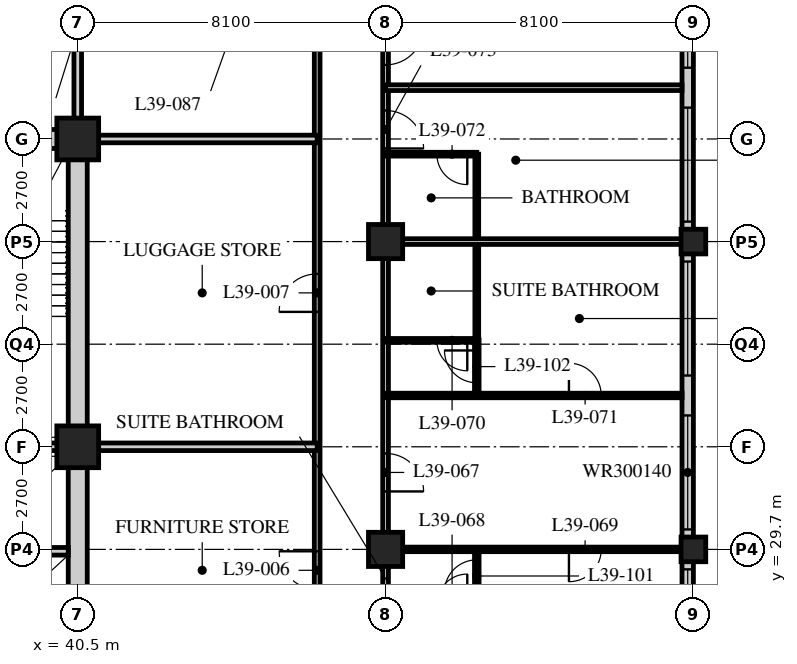
"""IFC4 building model, lengths in metres.
Left out: names, types, materials, properties, quantities, classifications, styles, units other than length and angle.
Written with IfcOpenShell. Run it as: python <this file> out.ifc"""

import sys

from ifc_helpers import new_model, si_unit, direction, frame, frame_2d, origin, origin_2d, place, context, subcontext, project, spatial, rectangle, hollow_rectangle, extrude, element, fill, save


model = new_model("IFC4")
c1 = context("Model", 3, precision=1e-05, world=origin(), true_north=direction((0.0, 1.0)))
c2 = subcontext(c1, "Body", "Model", "MODEL_VIEW")
j1 = project(units=[si_unit("LENGTHUNIT", "METRE"), si_unit("PLANEANGLEUNIT", "RADIAN")], contexts=[c1])
p1 = place(None, origin())
s1 = spatial("IfcSite", under=j1, at=p1, CompositionType="ELEMENT")
p2 = place(p1, origin())
s2 = spatial("IfcBuilding", under=s1, at=p2, CompositionType="ELEMENT")
p3 = place(p2, frame((0.0, 0.0, 151.0)))
s3 = spatial("IfcBuildingStorey", under=s2, at=p3, CompositionType="ELEMENT", Elevation=151.0)
for number, where, z_axis, x_axis in (
    (1, (40.5, 32.4, 0.0), (0.0, 0.0, 1.0), (1.0, 0.0, 0.0)),
    (2, (40.5, 40.5, 0.0), (0.0, 0.0, 1.0), (1.0, 0.0, 0.0)),
):
    element("IfcColumn", number, at=place(p3, frame(where, z_axis=z_axis, x_axis=x_axis)), inside=s3, PredefinedType="COLUMN", context=c2, shape_type="SweptSolid", body=[
        extrude(hollow_rectangle(XDim=1.1, YDim=1.1, WallThickness=0.1, at=origin_2d()), origin(), (0.0, 0.0, 1.0), 3.4),
    ])
for number, where, z_axis, x_axis in (
    (3, (48.6, 29.7, 0.0), (0.0, 0.0, 1.0), (1.0, 0.0, 0.0)),
    (4, (48.6, 37.8, 0.0), (0.0, 0.0, 1.0), (1.0, 0.0, 0.0)),
):
    element("IfcColumn", number, at=place(p3, frame(where, z_axis=z_axis, x_axis=x_axis)), inside=s3, PredefinedType="COLUMN", context=c2, shape_type="SweptSolid", body=[
        extrude(hollow_rectangle(XDim=0.9, YDim=0.9, WallThickness=0.1, at=origin_2d()), origin(), (0.0, 0.0, 1.0), 3.4),
    ])
for number, where, z_axis, x_axis in (
    (5, (56.7, 29.7, 0.0), (0.0, 0.0, 1.0), (1.0, 0.0, 0.0)),
    (6, (56.7, 37.8, 0.0), (0.0, 0.0, 1.0), (1.0, 0.0, 0.0)),
):
    element("IfcColumn", number, at=place(p3, frame(where, z_axis=z_axis, x_axis=x_axis)), inside=s3, PredefinedType="COLUMN", context=c2, shape_type="SweptSolid", body=[
        extrude(hollow_rectangle(XDim=0.65, YDim=0.65, WallThickness=0.055, at=origin_2d()), origin(), (0.0, 0.0, 1.0), 3.4),
    ])
p4 = place(p3, frame((56.55, 13.8, 0.0), z_axis=(0.0, 0.0, 1.0), x_axis=(0.0, 1.0, 0.0)))
e7 = element("IfcWall", 7, at=p4, inside=s3, PredefinedType="SOLIDWALL", context=c2, shape_type="SweptSolid", body=[
    extrude(rectangle(XDim=32.1, YDim=0.3, at=frame_2d((16.05, 0.0))), origin(), (0.0, 0.0, 1.0), 3.19),
])
p5 = place(p4, frame((0.225, 0.0, 0.9)))
e8 = element("IfcOpeningElement", 8, at=p5, cuts=e7, PredefinedType="OPENING", context=c2, shape_type="SweptSolid", body=[
    extrude(rectangle(XDim=3.0, YDim=1.4, at=frame_2d((1.5, 0.7))), frame((0.0, 0.16, 0.0), z_axis=(0.0, -1.0, 0.0), x_axis=(1.0, 0.0, 0.0)), (0.0, 0.0, 1.0), 0.32),
])
p6 = place(p4, frame((4.275, 0.0, 0.9)))
e9 = element("IfcOpeningElement", 9, at=p6, cuts=e7, PredefinedType="OPENING", context=c2, shape_type="SweptSolid", body=[
    extrude(rectangle(XDim=3.0, YDim=1.4, at=frame_2d((1.5, 0.7))), frame((0.0, 0.16, 0.0), z_axis=(0.0, -1.0, 0.0), x_axis=(1.0, 0.0, 0.0)), (0.0, 0.0, 1.0), 0.32),
])
p7 = place(p4, frame((8.325, 0.0, 0.9)))
e10 = element("IfcOpeningElement", 10, at=p7, cuts=e7, PredefinedType="OPENING", context=c2, shape_type="SweptSolid", body=[
    extrude(rectangle(XDim=3.0, YDim=1.4, at=frame_2d((1.5, 0.7))), frame((0.0, 0.16, 0.0), z_axis=(0.0, -1.0, 0.0), x_axis=(1.0, 0.0, 0.0)), (0.0, 0.0, 1.0), 0.32),
])
p8 = place(p4, frame((12.375, 0.0, 0.9)))
e11 = element("IfcOpeningElement", 11, at=p8, cuts=e7, PredefinedType="OPENING", context=c2, shape_type="SweptSolid", body=[
    extrude(rectangle(XDim=3.0, YDim=1.4, at=frame_2d((1.5, 0.7))), frame((0.0, 0.16, 0.0), z_axis=(0.0, -1.0, 0.0), x_axis=(1.0, 0.0, 0.0)), (0.0, 0.0, 1.0), 0.32),
])
p9 = place(p4, frame((16.425, 0.0, 0.9)))
e12 = element("IfcOpeningElement", 12, at=p9, cuts=e7, PredefinedType="OPENING", context=c2, shape_type="SweptSolid", body=[
    extrude(rectangle(XDim=3.0, YDim=1.4, at=frame_2d((1.5, 0.7))), frame((0.0, 0.16, 0.0), z_axis=(0.0, -1.0, 0.0), x_axis=(1.0, 0.0, 0.0)), (0.0, 0.0, 1.0), 0.32),
])
p10 = place(p4, frame((20.475, 0.0, 0.9)))
e13 = element("IfcOpeningElement", 13, at=p10, cuts=e7, PredefinedType="OPENING", context=c2, shape_type="SweptSolid", body=[
    extrude(rectangle(XDim=3.0, YDim=1.4, at=frame_2d((1.5, 0.7))), frame((0.0, 0.16, 0.0), z_axis=(0.0, -1.0, 0.0), x_axis=(1.0, 0.0, 0.0)), (0.0, 0.0, 1.0), 0.32),
])
p11 = place(p4, frame((24.525, 0.0, 0.9)))
e14 = element("IfcOpeningElement", 14, at=p11, cuts=e7, PredefinedType="OPENING", context=c2, shape_type="SweptSolid", body=[
    extrude(rectangle(XDim=3.0, YDim=1.4, at=frame_2d((1.5, 0.7))), frame((0.0, 0.16, 0.0), z_axis=(0.0, -1.0, 0.0), x_axis=(1.0, 0.0, 0.0)), (0.0, 0.0, 1.0), 0.32),
])
p12 = place(p4, frame((28.575, 0.0, 0.9)))
e15 = element("IfcOpeningElement", 15, at=p12, cuts=e7, PredefinedType="OPENING", context=c2, shape_type="SweptSolid", body=[
    extrude(rectangle(XDim=3.0, YDim=1.4, at=frame_2d((1.5, 0.7))), frame((0.0, 0.16, 0.0), z_axis=(0.0, -1.0, 0.0), x_axis=(1.0, 0.0, 0.0)), (0.0, 0.0, 1.0), 0.32),
])
p13 = place(p3, frame((48.6, 17.55, 0.0), z_axis=(0.0, 0.0, 1.0), x_axis=(0.0, 1.0, 0.0)))
e16 = element("IfcWall", 16, at=p13, inside=s3, PredefinedType="PARTITIONING", context=c2, shape_type="SweptSolid", body=[
    extrude(rectangle(XDim=28.35, YDim=0.15, at=frame_2d((14.175, 0.0))), origin(), (0.0, 0.0, 1.0), 2.42),
])
p14 = place(p13, frame((0.3, 0.0, 0.0)))
e17 = element("IfcOpeningElement", 17, at=p14, cuts=e16, PredefinedType="OPENING", context=c2, shape_type="SweptSolid", body=[
    extrude(rectangle(XDim=1.0, YDim=2.1, at=frame_2d((0.5, 1.05))), frame((0.0, 0.085, 0.0), z_axis=(0.0, -1.0, 0.0), x_axis=(1.0, 0.0, 0.0)), (0.0, 0.0, 1.0), 0.17),
])
p15 = place(p13, frame((6.5, 0.0, 0.0)))
e18 = element("IfcOpeningElement", 18, at=p15, cuts=e16, PredefinedType="OPENING", context=c2, shape_type="SweptSolid", body=[
    extrude(rectangle(XDim=1.0, YDim=2.1, at=frame_2d((0.5, 1.05))), frame((0.0, 0.085, 0.0), z_axis=(0.0, -1.0, 0.0), x_axis=(1.0, 0.0, 0.0)), (0.0, 0.0, 1.0), 0.17),
])
p16 = place(p13, frame((13.675, 0.0, 0.0)))
e19 = element("IfcOpeningElement", 19, at=p16, cuts=e16, PredefinedType="OPENING", context=c2, shape_type="SweptSolid", body=[
    extrude(rectangle(XDim=1.0, YDim=2.1, at=frame_2d((0.5, 1.05))), frame((0.0, 0.085, 0.0), z_axis=(0.0, -1.0, 0.0), x_axis=(1.0, 0.0, 0.0)), (0.0, 0.0, 1.0), 0.17),
])
p17 = place(p13, frame((22.7, 0.0, 0.0)))
e20 = element("IfcOpeningElement", 20, at=p17, cuts=e16, PredefinedType="OPENING", context=c2, shape_type="SweptSolid", body=[
    extrude(rectangle(XDim=1.0, YDim=2.1, at=frame_2d((0.5, 1.05))), frame((0.0, 0.085, 0.0), z_axis=(0.0, -1.0, 0.0), x_axis=(1.0, 0.0, 0.0)), (0.0, 0.0, 1.0), 0.17),
])
p18 = place(p13, frame((24.9, 0.0, 0.0)))
e21 = element("IfcOpeningElement", 21, at=p18, cuts=e16, PredefinedType="OPENING", context=c2, shape_type="SweptSolid", body=[
    extrude(rectangle(XDim=1.0, YDim=2.1, at=frame_2d((0.5, 1.05))), frame((0.0, 0.085, 0.0), z_axis=(0.0, -1.0, 0.0), x_axis=(1.0, 0.0, 0.0)), (0.0, 0.0, 1.0), 0.17),
])
p19 = place(p3, frame((46.8, 19.35, 0.0), z_axis=(0.0, 0.0, 1.0), x_axis=(0.0, 1.0, 0.0)))
e22 = element("IfcWall", 22, at=p19, inside=s3, PredefinedType="PARTITIONING", context=c2, shape_type="SweptSolid", body=[
    extrude(rectangle(XDim=24.75, YDim=0.15, at=frame_2d((12.375, 0.0))), origin(), (0.0, 0.0, 1.0), 3.19),
])
p20 = place(p19, frame((5.25, 0.0, 0.0)))
e23 = element("IfcOpeningElement", 23, at=p20, cuts=e22, PredefinedType="OPENING", context=c2, shape_type="SweptSolid", body=[
    extrude(rectangle(XDim=1.0, YDim=2.1, at=frame_2d((0.5, 1.05))), frame((0.0, 0.085, 0.0), z_axis=(0.0, -1.0, 0.0), x_axis=(1.0, 0.0, 0.0)), (0.0, 0.0, 1.0), 0.17),
])
p21 = place(p19, frame((9.3, 0.0, 0.0)))
e24 = element("IfcOpeningElement", 24, at=p21, cuts=e22, PredefinedType="OPENING", context=c2, shape_type="SweptSolid", body=[
    extrude(rectangle(XDim=1.0, YDim=2.1, at=frame_2d((0.5, 1.05))), frame((0.0, 0.085, 0.0), z_axis=(0.0, -1.0, 0.0), x_axis=(1.0, 0.0, 0.0)), (0.0, 0.0, 1.0), 0.17),
])
p22 = place(p19, frame((16.6, 0.0, 0.0)))
e25 = element("IfcOpeningElement", 25, at=p22, cuts=e22, PredefinedType="OPENING", context=c2, shape_type="SweptSolid", body=[
    extrude(rectangle(XDim=1.0, YDim=2.1, at=frame_2d((0.5, 1.05))), frame((0.0, 0.085, 0.0), z_axis=(0.0, -1.0, 0.0), x_axis=(1.0, 0.0, 0.0)), (0.0, 0.0, 1.0), 0.17),
])
p23 = place(p3, frame((40.5, 32.4, 0.0), z_axis=(0.0, 0.0, 1.0), x_axis=(1.0, 0.0, 0.0)))
e26 = element("IfcWall", 26, at=p23, inside=s3, PredefinedType="SOLIDWALL", context=c2, shape_type="SweptSolid", body=[
    extrude(rectangle(XDim=6.3, YDim=0.2, at=frame_2d((3.15, 0.0))), origin(), (0.0, 0.0, 1.0), 3.19),
])
p24 = place(p3, frame((40.5, 40.5, 0.0), z_axis=(0.0, 0.0, 1.0), x_axis=(0.0, 1.0, 0.0)))
e27 = element("IfcWall", 27, at=p24, inside=s3, PredefinedType="SOLIDWALL", context=c2, shape_type="SweptSolid", body=[
    extrude(rectangle(XDim=3.6, YDim=0.2, at=frame_2d((1.8, 0.0))), origin(), (0.0, 0.0, 1.0), 2.42),
])
p25 = place(p3, frame((40.5, 40.5, 0.0), z_axis=(0.0, 0.0, 1.0), x_axis=(1.0, 0.0, 0.0)))
e28 = element("IfcWall", 28, at=p25, inside=s3, PredefinedType="SOLIDWALL", context=c2, shape_type="SweptSolid", body=[
    extrude(rectangle(XDim=6.3, YDim=0.2, at=frame_2d((3.15, 0.0))), origin(), (0.0, 0.0, 1.0), 3.19),
])
p26 = place(p3, frame((48.6, 29.7, 0.0), z_axis=(0.0, 0.0, 1.0), x_axis=(1.0, 0.0, 0.0)))
e29 = element("IfcWall", 29, at=p26, inside=s3, PredefinedType="PARTITIONING", context=c2, shape_type="SweptSolid", body=[
    extrude(rectangle(XDim=7.8, YDim=0.12, at=frame_2d((3.9, 0.0))), origin(), (0.0, 0.0, 1.0), 2.42),
])
p27 = place(p26, frame((4.825, 0.0, 0.0)))
e30 = element("IfcOpeningElement", 30, at=p27, cuts=e29, PredefinedType="OPENING", context=c2, shape_type="SweptSolid", body=[
    extrude(rectangle(XDim=0.85, YDim=2.1, at=frame_2d((0.425, 1.05))), frame((0.0, 0.07, 0.0), z_axis=(0.0, -1.0, 0.0), x_axis=(1.0, 0.0, 0.0)), (0.0, 0.0, 1.0), 0.14),
])
p28 = place(p3, frame((51.0, 35.2, 0.0), z_axis=(0.0, 0.0, 1.0), x_axis=(0.0, 1.0, 0.0)))
e31 = element("IfcWall", 31, at=p28, inside=s3, PredefinedType="PARTITIONING", context=c2, shape_type="SweptSolid", body=[
    extrude(rectangle(XDim=4.9, YDim=0.1, at=frame_2d((2.45, 0.0))), origin(), (0.0, 0.0, 1.0), 3.19),
])
p29 = place(p3, frame((48.6, 35.2, 0.0), z_axis=(0.0, 0.0, 1.0), x_axis=(1.0, 0.0, 0.0)))
e32 = element("IfcWall", 32, at=p29, inside=s3, PredefinedType="PARTITIONING", context=c2, shape_type="SweptSolid", body=[
    extrude(rectangle(XDim=2.4, YDim=0.1, at=frame_2d((1.2, 0.0))), origin(), (0.0, 0.0, 1.0), 3.19),
])
p30 = place(p29, frame((1.35, 0.0, 0.0)))
e33 = element("IfcOpeningElement", 33, at=p30, cuts=e32, PredefinedType="OPENING", context=c2, shape_type="SweptSolid", body=[
    extrude(rectangle(XDim=0.8, YDim=2.1, at=frame_2d((0.4, 1.05))), frame((0.0, 0.06, 0.0), z_axis=(0.0, -1.0, 0.0), x_axis=(1.0, 0.0, 0.0)), (0.0, 0.0, 1.0), 0.12),
])
p31 = place(p3, frame((48.6, 33.75, 0.0), z_axis=(0.0, 0.0, 1.0), x_axis=(1.0, 0.0, 0.0)))
e34 = element("IfcWall", 34, at=p31, inside=s3, PredefinedType="PARTITIONING", context=c2, shape_type="SweptSolid", body=[
    extrude(rectangle(XDim=7.8, YDim=0.12, at=frame_2d((3.9, 0.0))), origin(), (0.0, 0.0, 1.0), 3.19),
])
p32 = place(p31, frame((4.825, 0.0, 0.0)))
e35 = element("IfcOpeningElement", 35, at=p32, cuts=e34, PredefinedType="OPENING", context=c2, shape_type="SweptSolid", body=[
    extrude(rectangle(XDim=0.85, YDim=2.1, at=frame_2d((0.425, 1.05))), frame((0.0, 0.07, 0.0), z_axis=(0.0, -1.0, 0.0), x_axis=(1.0, 0.0, 0.0)), (0.0, 0.0, 1.0), 0.14),
])
p33 = place(p3, frame((48.6, 37.8, 0.0), z_axis=(0.0, 0.0, 1.0), x_axis=(1.0, 0.0, 0.0)))
e36 = element("IfcWall", 36, at=p33, inside=s3, PredefinedType="PARTITIONING", context=c2, shape_type="SweptSolid", body=[
    extrude(rectangle(XDim=7.8, YDim=0.15, at=frame_2d((3.9, 0.0))), origin(), (0.0, 0.0, 1.0), 2.42),
])
p34 = place(p3, frame((48.6, 40.1, 0.0), z_axis=(0.0, 0.0, 1.0), x_axis=(1.0, 0.0, 0.0)))
e37 = element("IfcWall", 37, at=p34, inside=s3, PredefinedType="PARTITIONING", context=c2, shape_type="SweptSolid", body=[
    extrude(rectangle(XDim=2.4, YDim=0.1, at=frame_2d((1.2, 0.0))), origin(), (0.0, 0.0, 1.0), 3.19),
])
p35 = place(p34, frame((1.35, 0.0, 0.0)))
e38 = element("IfcOpeningElement", 38, at=p35, cuts=e37, PredefinedType="OPENING", context=c2, shape_type="SweptSolid", body=[
    extrude(rectangle(XDim=0.8, YDim=2.1, at=frame_2d((0.4, 1.05))), frame((0.0, 0.06, 0.0), z_axis=(0.0, -1.0, 0.0), x_axis=(1.0, 0.0, 0.0)), (0.0, 0.0, 1.0), 0.12),
])
p36 = place(p3, frame((48.6, 41.85, 0.0), z_axis=(0.0, 0.0, 1.0), x_axis=(1.0, 0.0, 0.0)))
e39 = element("IfcWall", 39, at=p36, inside=s3, PredefinedType="PARTITIONING", context=c2, shape_type="SweptSolid", body=[
    extrude(rectangle(XDim=7.8, YDim=0.15, at=frame_2d((3.9, 0.0))), origin(), (0.0, 0.0, 1.0), 3.19),
])
p37 = place(p3, frame((51.0, 29.7, 0.0), z_axis=(0.0, 0.0, 1.0), x_axis=(0.0, -1.0, 0.0)))
e40 = element("IfcWall", 40, at=p37, inside=s3, PredefinedType="PARTITIONING", context=c2, shape_type="SweptSolid", body=[
    extrude(rectangle(XDim=1.46, YDim=0.12, at=frame_2d((0.73, 0.0))), origin(), (0.0, 0.0, 1.0), 3.19),
])
p38 = place(p37, frame((0.275, 0.0, 0.0)))
e41 = element("IfcOpeningElement", 41, at=p38, cuts=e40, PredefinedType="OPENING", context=c2, shape_type="SweptSolid", body=[
    extrude(rectangle(XDim=0.85, YDim=2.1, at=frame_2d((0.425, 1.05))), frame((0.0, 0.07, 0.0), z_axis=(0.0, -1.0, 0.0), x_axis=(1.0, 0.0, 0.0)), (0.0, 0.0, 1.0), 0.14),
])
p39 = place(p3, frame((51.0, 35.21, 0.0), z_axis=(0.0, 0.0, 1.0), x_axis=(0.0, -1.0, 0.0)))
e42 = element("IfcWall", 42, at=p39, inside=s3, PredefinedType="PARTITIONING", context=c2, shape_type="SweptSolid", body=[
    extrude(rectangle(XDim=1.46, YDim=0.12, at=frame_2d((0.73, 0.0))), origin(), (0.0, 0.0, 1.0), 3.19),
])
p40 = place(p39, frame((0.275, 0.0, 0.0)))
e43 = element("IfcOpeningElement", 43, at=p40, cuts=e42, PredefinedType="OPENING", context=c2, shape_type="SweptSolid", body=[
    extrude(rectangle(XDim=0.85, YDim=2.1, at=frame_2d((0.425, 1.05))), frame((0.0, 0.07, 0.0), z_axis=(0.0, -1.0, 0.0), x_axis=(1.0, 0.0, 0.0)), (0.0, 0.0, 1.0), 0.14),
])
p41 = place(p3, frame((15.95, 40.5, 0.0), z_axis=(0.0, 0.0, 1.0), x_axis=(1.0, 0.0, 0.0)))
e44 = element("IfcWall", 44, at=p41, inside=s3, PredefinedType="SOLIDWALL", context=c2, shape_type="SweptSolid", body=[
    extrude(rectangle(XDim=24.8, YDim=0.5, at=frame_2d((12.4, 0.0))), origin(), (0.0, 0.0, 1.0), 2.42),
])
p42 = place(p41, frame((11.5, 0.0, 0.0)))
e45 = element("IfcOpeningElement", 45, at=p42, cuts=e44, PredefinedType="OPENING", context=c2, shape_type="SweptSolid", body=[
    extrude(rectangle(XDim=1.8, YDim=2.4, at=frame_2d((0.9, 1.2))), frame((0.0, 0.26, 0.0), z_axis=(0.0, -1.0, 0.0), x_axis=(1.0, 0.0, 0.0)), (0.0, 0.0, 1.0), 0.52),
])
p43 = place(p3, frame((40.5, 24.55, 0.0), z_axis=(0.0, 0.0, 1.0), x_axis=(0.0, 1.0, 0.0)))
e46 = element("IfcWall", 46, at=p43, inside=s3, PredefinedType="SOLIDWALL", context=c2, shape_type="SweptSolid", body=[
    extrude(rectangle(XDim=15.7, YDim=0.5, at=frame_2d((7.85, 0.0))), origin(), (0.0, 0.0, 1.0), 2.42),
])
p44 = place(p3, frame((32.3, 32.4, 0.0), z_axis=(0.0, 0.0, 1.0), x_axis=(1.0, 0.0, 0.0)))
e47 = element("IfcWall", 47, at=p44, inside=s3, PredefinedType="SOLIDWALL", context=c2, shape_type="SweptSolid", body=[
    extrude(rectangle(XDim=7.95, YDim=0.2, at=frame_2d((3.975, 0.0))), origin(), (0.0, 0.0, 1.0), 2.578),
])
p45 = place(p3, frame((37.65, 29.65, 0.0), z_axis=(0.0, 0.0, 1.0), x_axis=(1.0, 0.0, 0.0)))
e48 = element("IfcWall", 48, at=p45, inside=s3, PredefinedType="SOLIDWALL", context=c2, shape_type="SweptSolid", body=[
    extrude(rectangle(XDim=2.6, YDim=0.2, at=frame_2d((1.3, 0.0))), origin(), (0.0, 0.0, 1.0), 3.19),
])
p46 = place(p8, origin())
e49 = element("IfcWindow", 49, at=p46, inside=s3, PartitioningType="SINGLE_PANEL", PredefinedType="WINDOW", context=c2, shape_type="SweptSolid", body=[
    extrude(rectangle(XDim=3.0, YDim=1.4, at=frame_2d((1.5, 0.7))), frame((0.0, 0.03, 0.0), z_axis=(0.0, -1.0, 0.0), x_axis=(1.0, 0.0, 0.0)), (0.0, 0.0, 1.0), 0.06),
])
fill(e11, e49)
p47 = place(p9, origin())
e50 = element("IfcWindow", 50, at=p47, inside=s3, PartitioningType="SINGLE_PANEL", PredefinedType="WINDOW", context=c2, shape_type="SweptSolid", body=[
    extrude(rectangle(XDim=3.0, YDim=1.4, at=frame_2d((1.5, 0.7))), frame((0.0, 0.03, 0.0), z_axis=(0.0, -1.0, 0.0), x_axis=(1.0, 0.0, 0.0)), (0.0, 0.0, 1.0), 0.06),
])
fill(e12, e50)
p48 = place(p10, origin())
e51 = element("IfcWindow", 51, at=p48, inside=s3, PartitioningType="SINGLE_PANEL", PredefinedType="WINDOW", context=c2, shape_type="SweptSolid", body=[
    extrude(rectangle(XDim=3.0, YDim=1.4, at=frame_2d((1.5, 0.7))), frame((0.0, 0.03, 0.0), z_axis=(0.0, -1.0, 0.0), x_axis=(1.0, 0.0, 0.0)), (0.0, 0.0, 1.0), 0.06),
])
fill(e13, e51)
p49 = place(p11, origin())
e52 = element("IfcWindow", 52, at=p49, inside=s3, PartitioningType="SINGLE_PANEL", PredefinedType="WINDOW", context=c2, shape_type="SweptSolid", body=[
    extrude(rectangle(XDim=3.0, YDim=1.4, at=frame_2d((1.5, 0.7))), frame((0.0, 0.03, 0.0), z_axis=(0.0, -1.0, 0.0), x_axis=(1.0, 0.0, 0.0)), (0.0, 0.0, 1.0), 0.06),
])
fill(e14, e52)
p50 = place(p12, origin())
e53 = element("IfcWindow", 53, at=p50, inside=s3, PartitioningType="SINGLE_PANEL", PredefinedType="WINDOW", context=c2, shape_type="SweptSolid", body=[
    extrude(rectangle(XDim=3.0, YDim=1.4, at=frame_2d((1.5, 0.7))), frame((0.0, 0.03, 0.0), z_axis=(0.0, -1.0, 0.0), x_axis=(1.0, 0.0, 0.0)), (0.0, 0.0, 1.0), 0.06),
])
fill(e15, e53)
p51 = place(p21, origin())
e54 = element("IfcDoor", 54, at=p51, inside=s3, OperationType="SINGLE_SWING_RIGHT", PredefinedType="DOOR", context=c2, shape_type="SweptSolid", body=[
    extrude(rectangle(XDim=1.0, YDim=2.1, at=frame_2d((0.5, 1.05))), frame((0.0, 0.025, 0.0), z_axis=(0.0, -1.0, 0.0), x_axis=(1.0, 0.0, 0.0)), (0.0, 0.0, 1.0), 0.05),
])
fill(e24, e54)
p52 = place(p22, origin())
e55 = element("IfcDoor", 55, at=p52, inside=s3, OperationType="SINGLE_SWING_LEFT", PredefinedType="DOOR", context=c2, shape_type="SweptSolid", body=[
    extrude(rectangle(XDim=1.0, YDim=2.1, at=frame_2d((0.5, 1.05))), frame((0.0, 0.025, 0.0), z_axis=(0.0, -1.0, 0.0), x_axis=(1.0, 0.0, 0.0)), (0.0, 0.0, 1.0), 0.05),
])
fill(e25, e55)
p53 = place(p16, origin())
e56 = element("IfcDoor", 56, at=p53, inside=s3, OperationType="SINGLE_SWING_RIGHT", PredefinedType="DOOR", context=c2, shape_type="SweptSolid", body=[
    extrude(rectangle(XDim=1.0, YDim=2.1, at=frame_2d((0.5, 1.05))), frame((0.0, 0.025, 0.0), z_axis=(0.0, -1.0, 0.0), x_axis=(1.0, 0.0, 0.0)), (0.0, 0.0, 1.0), 0.05),
])
fill(e19, e56)
p54 = place(p27, origin())
e57 = element("IfcDoor", 57, at=p54, inside=s3, OperationType="SINGLE_SWING_RIGHT", PredefinedType="DOOR", context=c2, shape_type="SweptSolid", body=[
    extrude(rectangle(XDim=0.85, YDim=2.1, at=frame_2d((0.425, 1.05))), frame((0.0, 0.025, 0.0), z_axis=(0.0, -1.0, 0.0), x_axis=(1.0, 0.0, 0.0)), (0.0, 0.0, 1.0), 0.05),
])
fill(e30, e57)
p55 = place(p30, origin())
e58 = element("IfcDoor", 58, at=p55, inside=s3, OperationType="SINGLE_SWING_LEFT", PredefinedType="DOOR", context=c2, shape_type="SweptSolid", body=[
    extrude(rectangle(XDim=0.8, YDim=2.1, at=frame_2d((0.4, 1.05))), frame((0.0, 0.025, 0.0), z_axis=(0.0, -1.0, 0.0), x_axis=(1.0, 0.0, 0.0)), (0.0, 0.0, 1.0), 0.05),
])
fill(e33, e58)
p56 = place(p32, origin())
e59 = element("IfcDoor", 59, at=p56, inside=s3, OperationType="SINGLE_SWING_LEFT", PredefinedType="DOOR", context=c2, shape_type="SweptSolid", body=[
    extrude(rectangle(XDim=0.85, YDim=2.1, at=frame_2d((0.425, 1.05))), frame((0.0, 0.025, 0.0), z_axis=(0.0, -1.0, 0.0), x_axis=(1.0, 0.0, 0.0)), (0.0, 0.0, 1.0), 0.05),
])
fill(e35, e59)
p57 = place(p35, origin())
e60 = element("IfcDoor", 60, at=p57, inside=s3, OperationType="SINGLE_SWING_LEFT", PredefinedType="DOOR", context=c2, shape_type="SweptSolid", body=[
    extrude(rectangle(XDim=0.8, YDim=2.1, at=frame_2d((0.4, 1.05))), frame((0.0, 0.025, 0.0), z_axis=(0.0, -1.0, 0.0), x_axis=(1.0, 0.0, 0.0)), (0.0, 0.0, 1.0), 0.05),
])
fill(e38, e60)
p58 = place(p17, origin())
e61 = element("IfcDoor", 61, at=p58, inside=s3, OperationType="SINGLE_SWING_RIGHT", PredefinedType="DOOR", context=c2, shape_type="SweptSolid", body=[
    extrude(rectangle(XDim=1.0, YDim=2.1, at=frame_2d((0.5, 1.05))), frame((0.0, 0.025, 0.0), z_axis=(0.0, -1.0, 0.0), x_axis=(1.0, 0.0, 0.0)), (0.0, 0.0, 1.0), 0.05),
])
fill(e20, e61)
p59 = place(p18, origin())
e62 = element("IfcDoor", 62, at=p59, inside=s3, OperationType="SINGLE_SWING_LEFT", PredefinedType="DOOR", context=c2, shape_type="SweptSolid", body=[
    extrude(rectangle(XDim=1.0, YDim=2.1, at=frame_2d((0.5, 1.05))), frame((0.0, 0.025, 0.0), z_axis=(0.0, -1.0, 0.0), x_axis=(1.0, 0.0, 0.0)), (0.0, 0.0, 1.0), 0.05),
])
fill(e21, e62)
p60 = place(p38, origin())
e63 = element("IfcDoor", 63, at=p60, inside=s3, OperationType="SINGLE_SWING_LEFT", PredefinedType="DOOR", context=c2, shape_type="SweptSolid", body=[
    extrude(rectangle(XDim=0.85, YDim=2.1, at=frame_2d((0.425, 1.05))), frame((0.0, 0.025, 0.0), z_axis=(0.0, -1.0, 0.0), x_axis=(1.0, 0.0, 0.0)), (0.0, 0.0, 1.0), 0.05),
])
fill(e41, e63)
p61 = place(p40, origin())
e64 = element("IfcDoor", 64, at=p61, inside=s3, OperationType="SINGLE_SWING_RIGHT", PredefinedType="DOOR", context=c2, shape_type="SweptSolid", body=[
    extrude(rectangle(XDim=0.85, YDim=2.1, at=frame_2d((0.425, 1.05))), frame((0.0, 0.025, 0.0), z_axis=(0.0, -1.0, 0.0), x_axis=(1.0, 0.0, 0.0)), (0.0, 0.0, 1.0), 0.05),
])
fill(e43, e64)
save(model, sys.argv[1])
